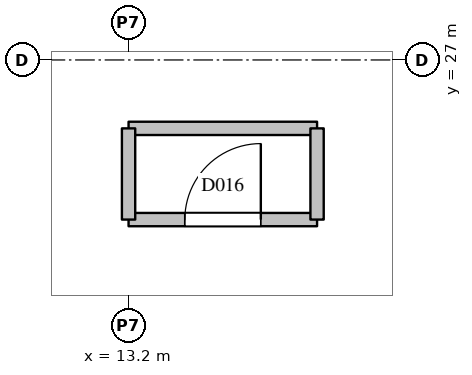
"""IFC4 building model, lengths in metres.
Left out: names, types, materials, properties, quantities, classifications, styles, units other than length and angle.
Written with IfcOpenShell. Run it as: python <this file> out.ifc"""

import sys

from ifc_helpers import new_model, si_unit, direction, frame, frame_2d, origin, place, context, subcontext, project, spatial, rectangle, extrude, element, fill, save


model = new_model("IFC4")
c1 = context("Model", 3, precision=1e-05, world=origin(), true_north=direction((0.0, 1.0)))
c2 = subcontext(c1, "Body", "Model", "MODEL_VIEW")
j1 = project(units=[si_unit("LENGTHUNIT", "METRE"), si_unit("PLANEANGLEUNIT", "RADIAN")], contexts=[c1])
p1 = place(None, origin())
s1 = spatial("IfcSite", under=j1, at=p1, CompositionType="ELEMENT")
p2 = place(p1, origin())
s2 = spatial("IfcBuilding", under=s1, at=p2, CompositionType="ELEMENT")
p3 = place(p2, frame((0.0, 0.0, 65.2)))
s3 = spatial("IfcBuildingStorey", under=s2, at=p3, CompositionType="ELEMENT", Elevation=65.2)
p4 = place(p3, frame((13.2, 24.9, 0.0), z_axis=(0.0, 0.0, 1.0), x_axis=(1.0, 0.0, 0.0)))
e1 = element("IfcWall", 1, at=p4, inside=s3, PredefinedType="PARTITIONING", context=c2, shape_type="SweptSolid", body=[
    extrude(rectangle(XDim=2.48, YDim=0.175, at=frame_2d((1.24, 0.0))), origin(), (0.0, 0.0, 1.0), 3.5),
])
p5 = place(p4, frame((0.74, 0.0, 0.0)))
e2 = element("IfcOpeningElement", 2, at=p5, cuts=e1, PredefinedType="OPENING", context=c2, shape_type="SweptSolid", body=[
    extrude(rectangle(XDim=1.0, YDim=2.1, at=frame_2d((0.5, 1.05))), frame((0.0, 0.097, 0.0), z_axis=(0.0, -1.0, 0.0), x_axis=(1.0, 0.0, 0.0)), (0.0, 0.0, 1.0), 0.195),
])
p6 = place(p3, frame((13.2, 26.1, 0.0), z_axis=(0.0, 0.0, 1.0), x_axis=(1.0, 0.0, 0.0)))
e3 = element("IfcWall", 3, at=p6, inside=s3, PredefinedType="PARTITIONING", context=c2, shape_type="SweptSolid", body=[
    extrude(rectangle(XDim=2.48, YDim=0.175, at=frame_2d((1.24, 0.0))), origin(), (0.0, 0.0, 1.0), 3.5),
])
for number, where, z_axis, x_axis in (
    (4, (13.2, 24.9, 0.0), (0.0, 0.0, 1.0), (0.0, 1.0, 0.0)),
    (5, (15.68, 24.9, 0.0), (0.0, 0.0, 1.0), (0.0, 1.0, 0.0)),
):
    element("IfcWall", number, at=place(p3, frame(where, z_axis=z_axis, x_axis=x_axis)), inside=s3, PredefinedType="PARTITIONING", context=c2, shape_type="SweptSolid", body=[
        extrude(rectangle(XDim=1.2, YDim=0.175, at=frame_2d((0.6, 0.0))), origin(), (0.0, 0.0, 1.0), 3.5),
    ])
p7 = place(p5, origin())
e6 = element("IfcDoor", 6, at=p7, inside=s3, OperationType="SINGLE_SWING_RIGHT", PredefinedType="DOOR", context=c2, shape_type="SweptSolid", body=[
    extrude(rectangle(XDim=1.0, YDim=2.1, at=frame_2d((0.5, 1.05))), frame((0.0, 0.025, 0.0), z_axis=(0.0, -1.0, 0.0), x_axis=(1.0, 0.0, 0.0)), (0.0, 0.0, 1.0), 0.05),
])
fill(e2, e6)
save(model, sys.argv[1])
